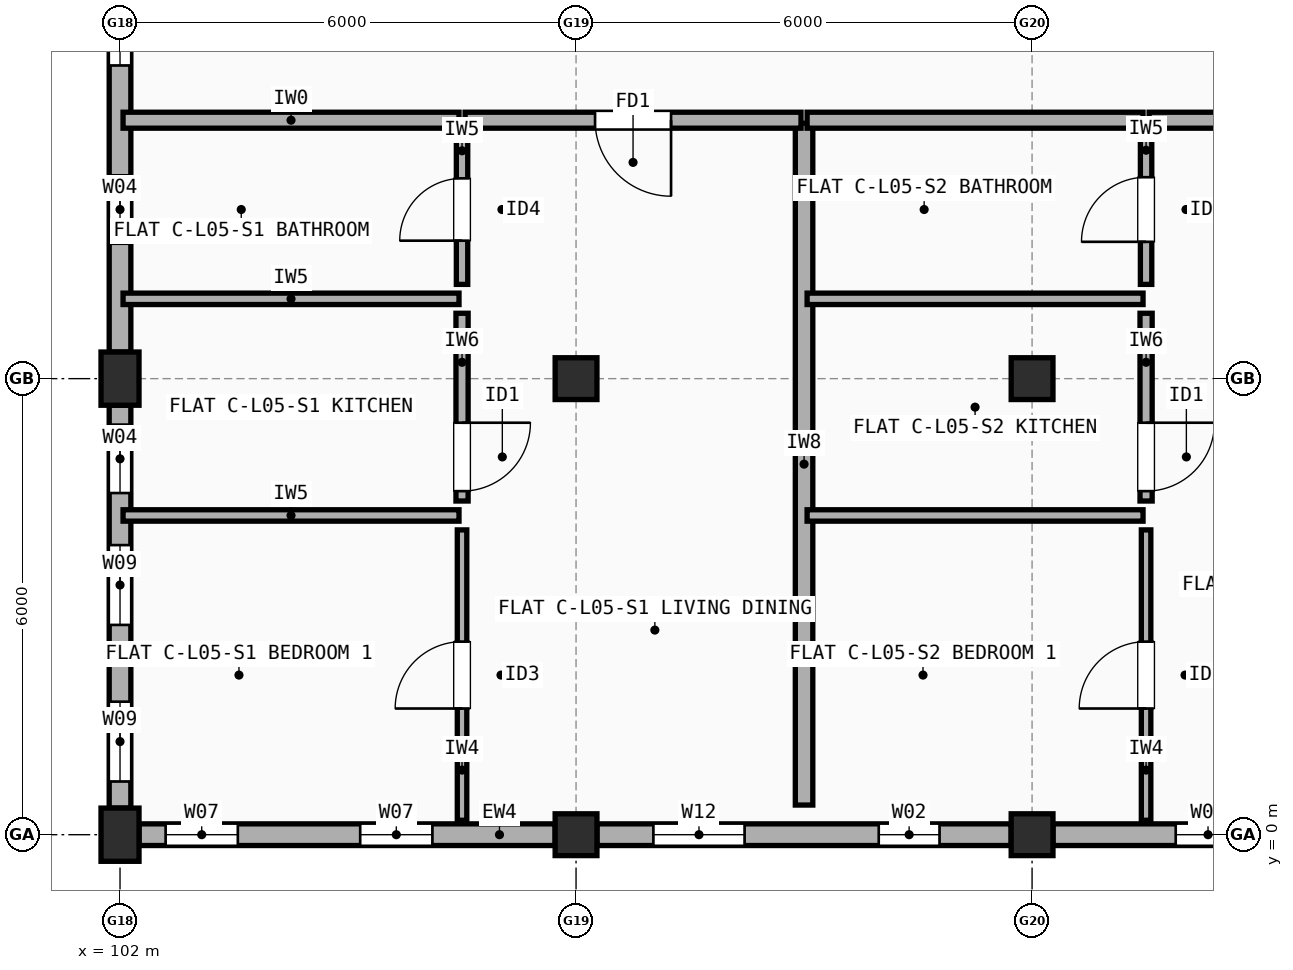
"""IFC4 building model, lengths in metres.
Left out: names, types, materials, properties, quantities, classifications, styles, units other than length and angle.
Written with IfcOpenShell. Run it as: python <this file> out.ifc"""

import sys

from ifc_helpers import new_model, si_unit, direction, frame, frame_2d, origin, origin_2d, place, context, subcontext, project, spatial, rectangle, extrude, element, fill, save


model = new_model("IFC4")
c1 = context("Model", 3, precision=1e-05, world=origin(), true_north=direction((0.0, 1.0)))
c2 = subcontext(c1, "Body", "Model", "MODEL_VIEW")
j1 = project(units=[si_unit("LENGTHUNIT", "METRE"), si_unit("PLANEANGLEUNIT", "RADIAN")], contexts=[c1])
p1 = place(None, origin())
s1 = spatial("IfcSite", under=j1, at=p1, CompositionType="ELEMENT")
p2 = place(p1, origin())
s2 = spatial("IfcBuilding", under=s1, at=p2, CompositionType="ELEMENT")
p3 = place(p2, frame((0.0, 0.0, 17.3)))
s3 = spatial("IfcBuildingStorey", under=s2, at=p3, CompositionType="ELEMENT", Elevation=17.3)
for number, where, z_axis, x_axis in (
    (1, (102.0, 0.0, 0.0), (0.0, 0.0, 1.0), (1.0, 0.0, 0.0)),
    (2, (102.0, 6.0, 0.0), (0.0, 0.0, 1.0), (1.0, 0.0, 0.0)),
):
    element("IfcColumn", number, at=place(p3, frame(where, z_axis=z_axis, x_axis=x_axis)), inside=s3, PredefinedType="COLUMN", context=c2, shape_type="SweptSolid", body=[
        extrude(rectangle(XDim=0.5, YDim=0.7, at=origin_2d()), origin(), (0.0, 0.0, 1.0), 2.965),
    ])
for number, where, z_axis, x_axis in (
    (3, (108.0, 0.0, 0.0), (0.0, 0.0, 1.0), (1.0, 0.0, 0.0)),
    (4, (108.0, 6.0, 0.0), (0.0, 0.0, 1.0), (1.0, 0.0, 0.0)),
    (5, (114.0, 0.0, 0.0), (0.0, 0.0, 1.0), (1.0, 0.0, 0.0)),
    (6, (114.0, 6.0, 0.0), (0.0, 0.0, 1.0), (1.0, 0.0, 0.0)),
):
    element("IfcColumn", number, at=place(p3, frame(where, z_axis=z_axis, x_axis=x_axis)), inside=s3, PredefinedType="COLUMN", context=c2, shape_type="SweptSolid", body=[
        extrude(rectangle(XDim=0.55, YDim=0.55, at=origin_2d()), origin(), (0.0, 0.0, 1.0), 2.965),
    ])
p4 = place(p3, frame((102.25, 0.0, 0.0), z_axis=(0.0, 0.0, 1.0), x_axis=(1.0, 0.0, 0.0)))
e7 = element("IfcWall", 7, at=p4, inside=s3, PredefinedType="STANDARD", context=c2, shape_type="SweptSolid", body=[
    extrude(rectangle(XDim=5.475, YDim=0.285, at=frame_2d((2.738, 0.0))), origin(), (0.0, 0.0, 1.0), 2.447),
])
p5 = place(p4, frame((0.35, 0.0, 0.9)))
e8 = element("IfcOpeningElement", 8, at=p5, cuts=e7, PredefinedType="OPENING", context=c2, shape_type="SweptSolid", body=[
    extrude(rectangle(XDim=0.95, YDim=1.35, at=frame_2d((0.475, 0.675))), frame((0.0, 0.152, 0.0), z_axis=(0.0, -1.0, 0.0), x_axis=(1.0, 0.0, 0.0)), (0.0, 0.0, 1.0), 0.305),
])
p6 = place(p4, frame((2.91, 0.0, 0.9)))
e9 = element("IfcOpeningElement", 9, at=p6, cuts=e7, PredefinedType="OPENING", context=c2, shape_type="SweptSolid", body=[
    extrude(rectangle(XDim=0.95, YDim=1.35, at=frame_2d((0.475, 0.675))), frame((0.0, 0.152, 0.0), z_axis=(0.0, -1.0, 0.0), x_axis=(1.0, 0.0, 0.0)), (0.0, 0.0, 1.0), 0.305),
])
p7 = place(p3, frame((108.275, 0.0, 0.0), z_axis=(0.0, 0.0, 1.0), x_axis=(1.0, 0.0, 0.0)))
e10 = element("IfcWall", 10, at=p7, inside=s3, PredefinedType="STANDARD", context=c2, shape_type="SweptSolid", body=[
    extrude(rectangle(XDim=5.45, YDim=0.285, at=frame_2d((2.725, 0.0))), origin(), (0.0, 0.0, 1.0), 2.447),
])
p8 = place(p7, frame((0.742, 0.0, 0.9)))
e11 = element("IfcOpeningElement", 11, at=p8, cuts=e10, PredefinedType="OPENING", context=c2, shape_type="SweptSolid", body=[
    extrude(rectangle(XDim=1.2, YDim=1.35, at=frame_2d((0.6, 0.675))), frame((0.0, 0.152, 0.0), z_axis=(0.0, -1.0, 0.0), x_axis=(1.0, 0.0, 0.0)), (0.0, 0.0, 1.0), 0.305),
])
p9 = place(p7, frame((3.708, 0.0, 0.9)))
e12 = element("IfcOpeningElement", 12, at=p9, cuts=e10, PredefinedType="OPENING", context=c2, shape_type="SweptSolid", body=[
    extrude(rectangle(XDim=0.8, YDim=1.2, at=frame_2d((0.4, 0.6))), frame((0.0, 0.152, 0.0), z_axis=(0.0, -1.0, 0.0), x_axis=(1.0, 0.0, 0.0)), (0.0, 0.0, 1.0), 0.305),
])
p10 = place(p3, frame((114.275, 0.0, 0.0), z_axis=(0.0, 0.0, 1.0), x_axis=(1.0, 0.0, 0.0)))
e13 = element("IfcWall", 13, at=p10, inside=s3, PredefinedType="STANDARD", context=c2, shape_type="SweptSolid", body=[
    extrude(rectangle(XDim=5.45, YDim=0.285, at=frame_2d((2.725, 0.0))), origin(), (0.0, 0.0, 1.0), 2.447),
])
p11 = place(p10, frame((1.615, 0.0, 0.9)))
e14 = element("IfcOpeningElement", 14, at=p11, cuts=e13, PredefinedType="OPENING", context=c2, shape_type="SweptSolid", body=[
    extrude(rectangle(XDim=0.85, YDim=1.25, at=frame_2d((0.425, 0.625))), frame((0.0, 0.152, 0.0), z_axis=(0.0, -1.0, 0.0), x_axis=(1.0, 0.0, 0.0)), (0.0, 0.0, 1.0), 0.305),
])
p12 = place(p10, frame((4.25, 0.0, 0.9)))
e15 = element("IfcOpeningElement", 15, at=p12, cuts=e13, PredefinedType="OPENING", context=c2, shape_type="SweptSolid", body=[
    extrude(rectangle(XDim=0.85, YDim=1.25, at=frame_2d((0.425, 0.625))), frame((0.0, 0.152, 0.0), z_axis=(0.0, -1.0, 0.0), x_axis=(1.0, 0.0, 0.0)), (0.0, 0.0, 1.0), 0.305),
])
p13 = place(p3, frame((102.0, 11.65, 0.0), z_axis=(0.0, 0.0, 1.0), x_axis=(0.0, -1.0, 0.0)))
e16 = element("IfcWall", 16, at=p13, inside=s3, PredefinedType="STANDARD", context=c2, shape_type="SweptSolid", body=[
    extrude(rectangle(XDim=5.3, YDim=0.285, at=frame_2d((2.65, 0.0))), origin(), (0.0, 0.0, 1.0), 2.447),
])
p14 = place(p13, frame((0.68, 0.0, 0.9)))
e17 = element("IfcOpeningElement", 17, at=p14, cuts=e16, PredefinedType="OPENING", context=c2, shape_type="SweptSolid", body=[
    extrude(rectangle(XDim=0.85, YDim=1.25, at=frame_2d((0.425, 0.625))), frame((0.0, 0.152, 0.0), z_axis=(0.0, -1.0, 0.0), x_axis=(1.0, 0.0, 0.0)), (0.0, 0.0, 1.0), 0.305),
])
p15 = place(p13, frame((2.975, 0.0, 0.9)))
e18 = element("IfcOpeningElement", 18, at=p15, cuts=e16, PredefinedType="OPENING", context=c2, shape_type="SweptSolid", body=[
    extrude(rectangle(XDim=0.9, YDim=1.3, at=frame_2d((0.45, 0.65))), frame((0.0, 0.152, 0.0), z_axis=(0.0, -1.0, 0.0), x_axis=(1.0, 0.0, 0.0)), (0.0, 0.0, 1.0), 0.305),
])
p16 = place(p3, frame((102.0, 5.65, 0.0), z_axis=(0.0, 0.0, 1.0), x_axis=(0.0, -1.0, 0.0)))
e19 = element("IfcWall", 19, at=p16, inside=s3, PredefinedType="STANDARD", context=c2, shape_type="SweptSolid", body=[
    extrude(rectangle(XDim=5.3, YDim=0.285, at=frame_2d((2.65, 0.0))), origin(), (0.0, 0.0, 1.0), 2.447),
])
p17 = place(p16, frame((0.255, 0.0, 0.9)))
e20 = element("IfcOpeningElement", 20, at=p17, cuts=e19, PredefinedType="OPENING", context=c2, shape_type="SweptSolid", body=[
    extrude(rectangle(XDim=0.9, YDim=1.3, at=frame_2d((0.45, 0.65))), frame((0.0, 0.152, 0.0), z_axis=(0.0, -1.0, 0.0), x_axis=(1.0, 0.0, 0.0)), (0.0, 0.0, 1.0), 0.305),
])
p18 = place(p16, frame((1.84, 0.0, 0.9)))
e21 = element("IfcOpeningElement", 21, at=p18, cuts=e19, PredefinedType="OPENING", context=c2, shape_type="SweptSolid", body=[
    extrude(rectangle(XDim=1.05, YDim=1.35, at=frame_2d((0.525, 0.675))), frame((0.0, 0.152, 0.0), z_axis=(0.0, -1.0, 0.0), x_axis=(1.0, 0.0, 0.0)), (0.0, 0.0, 1.0), 0.305),
])
p19 = place(p16, frame((3.9, 0.0, 0.9)))
e22 = element("IfcOpeningElement", 22, at=p19, cuts=e19, PredefinedType="OPENING", context=c2, shape_type="SweptSolid", body=[
    extrude(rectangle(XDim=1.05, YDim=1.35, at=frame_2d((0.525, 0.675))), frame((0.0, 0.152, 0.0), z_axis=(0.0, -1.0, 0.0), x_axis=(1.0, 0.0, 0.0)), (0.0, 0.0, 1.0), 0.305),
])
p20 = place(p3, frame((111.0, 0.39, 0.0), z_axis=(0.0, 0.0, 1.0), x_axis=(0.0, 1.0, 0.0)))
e23 = element("IfcWall", 23, at=p20, inside=s3, PredefinedType="SOLIDWALL", context=c2, shape_type="SweptSolid", body=[
    extrude(rectangle(XDim=8.97, YDim=0.23, at=frame_2d((4.485, 0.0))), origin(), (0.0, 0.0, 1.0), 2.447),
])
p21 = place(p3, frame((102.04, 9.4, 0.0), z_axis=(0.0, 0.0, 1.0), x_axis=(1.0, 0.0, 0.0)))
e24 = element("IfcWall", 24, at=p21, inside=s3, PredefinedType="SOLIDWALL", context=c2, shape_type="SweptSolid", body=[
    extrude(rectangle(XDim=4.42, YDim=0.21, at=frame_2d((2.21, 0.0))), origin(), (0.0, 0.0, 1.0), 2.447),
])
p22 = place(p3, frame((106.54, 9.4, 0.0), z_axis=(0.0, 0.0, 1.0), x_axis=(1.0, 0.0, 0.0)))
e25 = element("IfcWall", 25, at=p22, inside=s3, PredefinedType="SOLIDWALL", context=c2, shape_type="SweptSolid", body=[
    extrude(rectangle(XDim=4.42, YDim=0.21, at=frame_2d((2.21, 0.0))), origin(), (0.0, 0.0, 1.0), 2.458),
])
p23 = place(p22, frame((1.71, 0.0, 0.0)))
e26 = element("IfcOpeningElement", 26, at=p23, cuts=e25, PredefinedType="OPENING", context=c2, shape_type="SweptSolid", body=[
    extrude(rectangle(XDim=1.0, YDim=2.15, at=frame_2d((0.5, 1.075))), frame((0.0, 0.115, 0.0), z_axis=(0.0, -1.0, 0.0), x_axis=(1.0, 0.0, 0.0)), (0.0, 0.0, 1.0), 0.23),
])
p24 = place(p3, frame((106.5, 0.19, 0.0), z_axis=(0.0, 0.0, 1.0), x_axis=(0.0, 1.0, 0.0)))
e27 = element("IfcWall", 27, at=p24, inside=s3, PredefinedType="PARTITIONING", context=c2, shape_type="SweptSolid", body=[
    extrude(rectangle(XDim=3.82, YDim=0.125, at=frame_2d((1.91, 0.0))), origin(), (0.0, 0.0, 1.0), 2.965),
])
p25 = place(p24, frame((1.47, 0.0, 0.0)))
e28 = element("IfcOpeningElement", 28, at=p25, cuts=e27, PredefinedType="OPENING", context=c2, shape_type="SweptSolid", body=[
    extrude(rectangle(XDim=0.88, YDim=2.1, at=frame_2d((0.44, 1.05))), frame((0.0, 0.073, 0.0), z_axis=(0.0, -1.0, 0.0), x_axis=(1.0, 0.0, 0.0)), (0.0, 0.0, 1.0), 0.145),
])
p26 = place(p3, frame((106.5, 4.39, 0.0), z_axis=(0.0, 0.0, 1.0), x_axis=(0.0, 1.0, 0.0)))
e29 = element("IfcWall", 29, at=p26, inside=s3, PredefinedType="PLUMBINGWALL", context=c2, shape_type="SweptSolid", body=[
    extrude(rectangle(XDim=2.47, YDim=0.16, at=frame_2d((1.235, 0.0))), origin(), (0.0, 0.0, 1.0), 2.447),
])
p27 = place(p26, frame((0.13, 0.0, 0.0)))
e30 = element("IfcOpeningElement", 30, at=p27, cuts=e29, PredefinedType="OPENING", context=c2, shape_type="SweptSolid", body=[
    extrude(rectangle(XDim=0.9, YDim=2.1, at=frame_2d((0.45, 1.05))), frame((0.0, 0.09, 0.0), z_axis=(0.0, -1.0, 0.0), x_axis=(1.0, 0.0, 0.0)), (0.0, 0.0, 1.0), 0.18),
])
p28 = place(p3, frame((106.5, 7.24, 0.0), z_axis=(0.0, 0.0, 1.0), x_axis=(0.0, 1.0, 0.0)))
e31 = element("IfcWall", 31, at=p28, inside=s3, PredefinedType="PARTITIONING", context=c2, shape_type="SweptSolid", body=[
    extrude(rectangle(XDim=1.97, YDim=0.15, at=frame_2d((0.985, 0.0))), origin(), (0.0, 0.0, 1.0), 2.965),
])
p29 = place(p28, frame((0.575, 0.0, 0.0)))
e32 = element("IfcOpeningElement", 32, at=p29, cuts=e31, PredefinedType="OPENING", context=c2, shape_type="SweptSolid", body=[
    extrude(rectangle(XDim=0.82, YDim=2.08, at=frame_2d((0.41, 1.04))), frame((0.0, 0.085, 0.0), z_axis=(0.0, -1.0, 0.0), x_axis=(1.0, 0.0, 0.0)), (0.0, 0.0, 1.0), 0.17),
])
for number, where, z_axis, x_axis in (
    (33, (102.04, 4.2, 0.0), (0.0, 0.0, 1.0), (1.0, 0.0, 0.0)),
    (34, (102.04, 7.05, 0.0), (0.0, 0.0, 1.0), (1.0, 0.0, 0.0)),
):
    element("IfcWall", number, at=place(p3, frame(where, z_axis=z_axis, x_axis=x_axis)), inside=s3, PredefinedType="PARTITIONING", context=c2, shape_type="SweptSolid", body=[
        extrude(rectangle(XDim=4.42, YDim=0.15, at=frame_2d((2.21, 0.0))), origin(), (0.0, 0.0, 1.0), 2.447),
    ])
p30 = place(p3, frame((111.04, 9.4, 0.0), z_axis=(0.0, 0.0, 1.0), x_axis=(1.0, 0.0, 0.0)))
e35 = element("IfcWall", 35, at=p30, inside=s3, PredefinedType="SOLIDWALL", context=c2, shape_type="SweptSolid", body=[
    extrude(rectangle(XDim=4.42, YDim=0.21, at=frame_2d((2.21, 0.0))), origin(), (0.0, 0.0, 1.0), 2.548),
])
p31 = place(p3, frame((115.54, 9.4, 0.0), z_axis=(0.0, 0.0, 1.0), x_axis=(1.0, 0.0, 0.0)))
e36 = element("IfcWall", 36, at=p31, inside=s3, PredefinedType="SOLIDWALL", context=c2, shape_type="SweptSolid", body=[
    extrude(rectangle(XDim=4.42, YDim=0.21, at=frame_2d((2.21, 0.0))), origin(), (0.0, 0.0, 1.0), 2.458),
])
p32 = place(p31, frame((1.72, 0.0, 0.0)))
e37 = element("IfcOpeningElement", 37, at=p32, cuts=e36, PredefinedType="OPENING", context=c2, shape_type="SweptSolid", body=[
    extrude(rectangle(XDim=0.98, YDim=2.15, at=frame_2d((0.49, 1.075))), frame((0.0, 0.115, 0.0), z_axis=(0.0, -1.0, 0.0), x_axis=(1.0, 0.0, 0.0)), (0.0, 0.0, 1.0), 0.23),
])
p33 = place(p3, frame((115.5, 0.19, 0.0), z_axis=(0.0, 0.0, 1.0), x_axis=(0.0, 1.0, 0.0)))
e38 = element("IfcWall", 38, at=p33, inside=s3, PredefinedType="PARTITIONING", context=c2, shape_type="SweptSolid", body=[
    extrude(rectangle(XDim=3.82, YDim=0.125, at=frame_2d((1.91, 0.0))), origin(), (0.0, 0.0, 1.0), 2.965),
])
p34 = place(p33, frame((1.47, 0.0, 0.0)))
e39 = element("IfcOpeningElement", 39, at=p34, cuts=e38, PredefinedType="OPENING", context=c2, shape_type="SweptSolid", body=[
    extrude(rectangle(XDim=0.88, YDim=2.1, at=frame_2d((0.44, 1.05))), frame((0.0, 0.073, 0.0), z_axis=(0.0, -1.0, 0.0), x_axis=(1.0, 0.0, 0.0)), (0.0, 0.0, 1.0), 0.145),
])
p35 = place(p3, frame((115.5, 4.39, 0.0), z_axis=(0.0, 0.0, 1.0), x_axis=(0.0, 1.0, 0.0)))
e40 = element("IfcWall", 40, at=p35, inside=s3, PredefinedType="PLUMBINGWALL", context=c2, shape_type="SweptSolid", body=[
    extrude(rectangle(XDim=2.47, YDim=0.16, at=frame_2d((1.235, 0.0))), origin(), (0.0, 0.0, 1.0), 2.447),
])
p36 = place(p35, frame((0.13, 0.0, 0.0)))
e41 = element("IfcOpeningElement", 41, at=p36, cuts=e40, PredefinedType="OPENING", context=c2, shape_type="SweptSolid", body=[
    extrude(rectangle(XDim=0.9, YDim=2.1, at=frame_2d((0.45, 1.05))), frame((0.0, 0.09, 0.0), z_axis=(0.0, -1.0, 0.0), x_axis=(1.0, 0.0, 0.0)), (0.0, 0.0, 1.0), 0.18),
])
p37 = place(p3, frame((115.5, 7.24, 0.0), z_axis=(0.0, 0.0, 1.0), x_axis=(0.0, 1.0, 0.0)))
e42 = element("IfcWall", 42, at=p37, inside=s3, PredefinedType="PARTITIONING", context=c2, shape_type="SweptSolid", body=[
    extrude(rectangle(XDim=1.97, YDim=0.15, at=frame_2d((0.985, 0.0))), origin(), (0.0, 0.0, 1.0), 2.965),
])
p38 = place(p37, frame((0.56, 0.0, 0.0)))
e43 = element("IfcOpeningElement", 43, at=p38, cuts=e42, PredefinedType="OPENING", context=c2, shape_type="SweptSolid", body=[
    extrude(rectangle(XDim=0.85, YDim=2.1, at=frame_2d((0.425, 1.05))), frame((0.0, 0.085, 0.0), z_axis=(0.0, -1.0, 0.0), x_axis=(1.0, 0.0, 0.0)), (0.0, 0.0, 1.0), 0.17),
])
p39 = place(p3, frame((111.04, 4.2, 0.0), z_axis=(0.0, 0.0, 1.0), x_axis=(1.0, 0.0, 0.0)))
e44 = element("IfcWall", 44, at=p39, inside=s3, PredefinedType="PARTITIONING", context=c2, shape_type="SweptSolid", body=[
    extrude(rectangle(XDim=4.42, YDim=0.15, at=frame_2d((2.21, 0.0))), origin(), (0.0, 0.0, 1.0), 2.458),
])
p40 = place(p3, frame((111.04, 7.05, 0.0), z_axis=(0.0, 0.0, 1.0), x_axis=(1.0, 0.0, 0.0)))
e45 = element("IfcWall", 45, at=p40, inside=s3, PredefinedType="PARTITIONING", context=c2, shape_type="SweptSolid", body=[
    extrude(rectangle(XDim=4.42, YDim=0.15, at=frame_2d((2.21, 0.0))), origin(), (0.0, 0.0, 1.0), 2.548),
])
p41 = place(p5, origin())
e46 = element("IfcWindow", 46, at=p41, inside=s3, PartitioningType="SINGLE_PANEL", PredefinedType="WINDOW", context=c2, shape_type="SweptSolid", body=[
    extrude(rectangle(XDim=0.95, YDim=1.35, at=frame_2d((0.475, 0.675))), frame((0.0, 0.03, 0.0), z_axis=(0.0, -1.0, 0.0), x_axis=(1.0, 0.0, 0.0)), (0.0, 0.0, 1.0), 0.06),
])
fill(e8, e46)
p42 = place(p6, origin())
e47 = element("IfcWindow", 47, at=p42, inside=s3, PartitioningType="SINGLE_PANEL", PredefinedType="WINDOW", context=c2, shape_type="SweptSolid", body=[
    extrude(rectangle(XDim=0.95, YDim=1.35, at=frame_2d((0.475, 0.675))), frame((0.0, 0.03, 0.0), z_axis=(0.0, -1.0, 0.0), x_axis=(1.0, 0.0, 0.0)), (0.0, 0.0, 1.0), 0.06),
])
fill(e9, e47)
p43 = place(p8, origin())
e48 = element("IfcWindow", 48, at=p43, inside=s3, PartitioningType="SINGLE_PANEL", PredefinedType="WINDOW", context=c2, shape_type="SweptSolid", body=[
    extrude(rectangle(XDim=1.2, YDim=1.35, at=frame_2d((0.6, 0.675))), frame((0.0, 0.03, 0.0), z_axis=(0.0, -1.0, 0.0), x_axis=(1.0, 0.0, 0.0)), (0.0, 0.0, 1.0), 0.06),
])
fill(e11, e48)
p44 = place(p9, origin())
e49 = element("IfcWindow", 49, at=p44, inside=s3, PartitioningType="SINGLE_PANEL", PredefinedType="WINDOW", context=c2, shape_type="SweptSolid", body=[
    extrude(rectangle(XDim=0.8, YDim=1.2, at=frame_2d((0.4, 0.6))), frame((0.0, 0.03, 0.0), z_axis=(0.0, -1.0, 0.0), x_axis=(1.0, 0.0, 0.0)), (0.0, 0.0, 1.0), 0.06),
])
fill(e12, e49)
p45 = place(p11, origin())
e50 = element("IfcWindow", 50, at=p45, inside=s3, PartitioningType="SINGLE_PANEL", PredefinedType="WINDOW", context=c2, shape_type="SweptSolid", body=[
    extrude(rectangle(XDim=0.85, YDim=1.25, at=frame_2d((0.425, 0.625))), frame((0.0, 0.03, 0.0), z_axis=(0.0, -1.0, 0.0), x_axis=(1.0, 0.0, 0.0)), (0.0, 0.0, 1.0), 0.06),
])
fill(e14, e50)
p46 = place(p14, origin())
e51 = element("IfcWindow", 51, at=p46, inside=s3, PartitioningType="SINGLE_PANEL", PredefinedType="WINDOW", context=c2, shape_type="SweptSolid", body=[
    extrude(rectangle(XDim=0.85, YDim=1.25, at=frame_2d((0.425, 0.625))), frame((0.0, 0.03, 0.0), z_axis=(0.0, -1.0, 0.0), x_axis=(1.0, 0.0, 0.0)), (0.0, 0.0, 1.0), 0.06),
])
fill(e17, e51)
p47 = place(p15, origin())
e52 = element("IfcWindow", 52, at=p47, inside=s3, PartitioningType="SINGLE_PANEL", PredefinedType="WINDOW", context=c2, shape_type="SweptSolid", body=[
    extrude(rectangle(XDim=0.9, YDim=1.3, at=frame_2d((0.45, 0.65))), frame((0.0, 0.03, 0.0), z_axis=(0.0, -1.0, 0.0), x_axis=(1.0, 0.0, 0.0)), (0.0, 0.0, 1.0), 0.06),
])
fill(e18, e52)
p48 = place(p17, origin())
e53 = element("IfcWindow", 53, at=p48, inside=s3, PartitioningType="SINGLE_PANEL", PredefinedType="WINDOW", context=c2, shape_type="SweptSolid", body=[
    extrude(rectangle(XDim=0.9, YDim=1.3, at=frame_2d((0.45, 0.65))), frame((0.0, 0.03, 0.0), z_axis=(0.0, -1.0, 0.0), x_axis=(1.0, 0.0, 0.0)), (0.0, 0.0, 1.0), 0.06),
])
fill(e20, e53)
p49 = place(p18, origin())
e54 = element("IfcWindow", 54, at=p49, inside=s3, PartitioningType="SINGLE_PANEL", PredefinedType="WINDOW", context=c2, shape_type="SweptSolid", body=[
    extrude(rectangle(XDim=1.05, YDim=1.35, at=frame_2d((0.525, 0.675))), frame((0.0, 0.03, 0.0), z_axis=(0.0, -1.0, 0.0), x_axis=(1.0, 0.0, 0.0)), (0.0, 0.0, 1.0), 0.06),
])
fill(e21, e54)
p50 = place(p19, origin())
e55 = element("IfcWindow", 55, at=p50, inside=s3, PartitioningType="SINGLE_PANEL", PredefinedType="WINDOW", context=c2, shape_type="SweptSolid", body=[
    extrude(rectangle(XDim=1.05, YDim=1.35, at=frame_2d((0.525, 0.675))), frame((0.0, 0.03, 0.0), z_axis=(0.0, -1.0, 0.0), x_axis=(1.0, 0.0, 0.0)), (0.0, 0.0, 1.0), 0.06),
])
fill(e22, e55)
p51 = place(p23, origin())
e56 = element("IfcDoor", 56, at=p51, inside=s3, OperationType="SINGLE_SWING_RIGHT", PredefinedType="DOOR", context=c2, shape_type="SweptSolid", body=[
    extrude(rectangle(XDim=1.0, YDim=2.15, at=frame_2d((0.5, 1.075))), frame((0.0, 0.025, 0.0), z_axis=(0.0, -1.0, 0.0), x_axis=(1.0, 0.0, 0.0)), (0.0, 0.0, 1.0), 0.05),
])
fill(e26, e56)
p52 = place(p25, origin())
e57 = element("IfcDoor", 57, at=p52, inside=s3, OperationType="SINGLE_SWING_LEFT", PredefinedType="DOOR", context=c2, shape_type="SweptSolid", body=[
    extrude(rectangle(XDim=0.88, YDim=2.1, at=frame_2d((0.44, 1.05))), frame((0.0, 0.025, 0.0), z_axis=(0.0, -1.0, 0.0), x_axis=(1.0, 0.0, 0.0)), (0.0, 0.0, 1.0), 0.05),
])
fill(e28, e57)
p53 = place(p27, origin())
e58 = element("IfcDoor", 58, at=p53, inside=s3, OperationType="SINGLE_SWING_RIGHT", PredefinedType="DOOR", context=c2, shape_type="SweptSolid", body=[
    extrude(rectangle(XDim=0.9, YDim=2.1, at=frame_2d((0.45, 1.05))), frame((0.0, 0.025, 0.0), z_axis=(0.0, -1.0, 0.0), x_axis=(1.0, 0.0, 0.0)), (0.0, 0.0, 1.0), 0.05),
])
fill(e30, e58)
p54 = place(p29, origin())
e59 = element("IfcDoor", 59, at=p54, inside=s3, OperationType="SINGLE_SWING_LEFT", PredefinedType="DOOR", context=c2, shape_type="SweptSolid", body=[
    extrude(rectangle(XDim=0.82, YDim=2.08, at=frame_2d((0.41, 1.04))), frame((0.0, 0.025, 0.0), z_axis=(0.0, -1.0, 0.0), x_axis=(1.0, 0.0, 0.0)), (0.0, 0.0, 1.0), 0.05),
])
fill(e32, e59)
p55 = place(p34, origin())
e60 = element("IfcDoor", 60, at=p55, inside=s3, OperationType="SINGLE_SWING_LEFT", PredefinedType="DOOR", context=c2, shape_type="SweptSolid", body=[
    extrude(rectangle(XDim=0.88, YDim=2.1, at=frame_2d((0.44, 1.05))), frame((0.0, 0.025, 0.0), z_axis=(0.0, -1.0, 0.0), x_axis=(1.0, 0.0, 0.0)), (0.0, 0.0, 1.0), 0.05),
])
fill(e39, e60)
p56 = place(p36, origin())
e61 = element("IfcDoor", 61, at=p56, inside=s3, OperationType="SINGLE_SWING_RIGHT", PredefinedType="DOOR", context=c2, shape_type="SweptSolid", body=[
    extrude(rectangle(XDim=0.9, YDim=2.1, at=frame_2d((0.45, 1.05))), frame((0.0, 0.025, 0.0), z_axis=(0.0, -1.0, 0.0), x_axis=(1.0, 0.0, 0.0)), (0.0, 0.0, 1.0), 0.05),
])
fill(e41, e61)
p57 = place(p38, origin())
e62 = element("IfcDoor", 62, at=p57, inside=s3, OperationType="SINGLE_SWING_LEFT", PredefinedType="DOOR", context=c2, shape_type="SweptSolid", body=[
    extrude(rectangle(XDim=0.85, YDim=2.1, at=frame_2d((0.425, 1.05))), frame((0.0, 0.025, 0.0), z_axis=(0.0, -1.0, 0.0), x_axis=(1.0, 0.0, 0.0)), (0.0, 0.0, 1.0), 0.05),
])
fill(e43, e62)
save(model, sys.argv[1])
